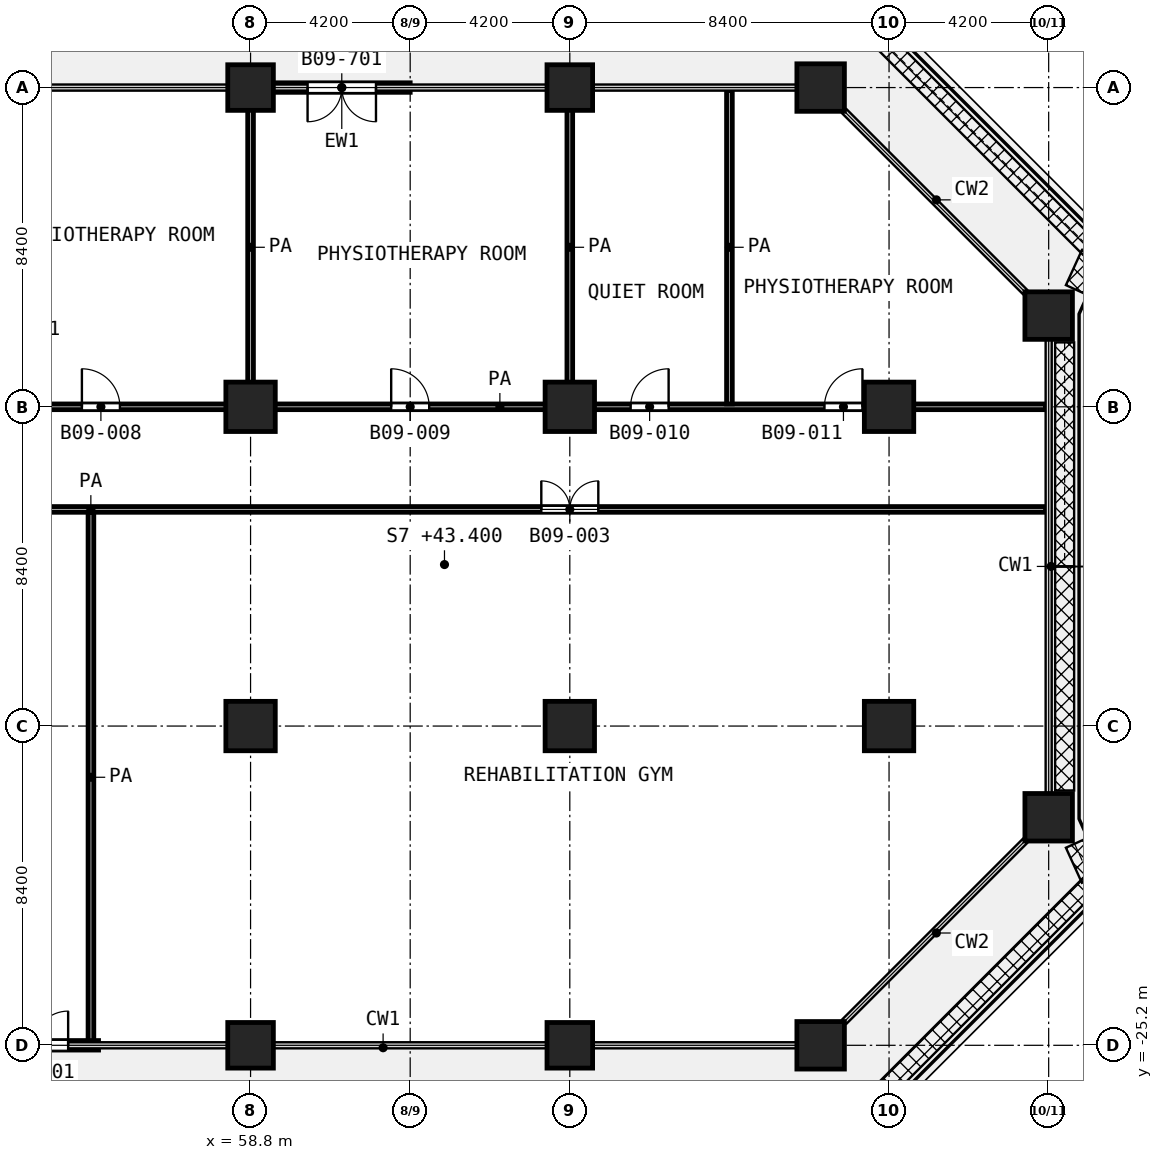
"""IFC4 building model, lengths in metres.
Left out: names, types, materials, properties, quantities, classifications, styles, units other than length and angle.
Written with IfcOpenShell. Run it as: python <this file> out.ifc"""

import sys

from ifc_helpers import new_model, si_unit, direction, frame, frame_2d, origin, origin_2d, place, context, subcontext, project, spatial, rectangle, extrude, element, fill, save


model = new_model("IFC4")
c1 = context("Model", 3, precision=1e-05, world=origin(), true_north=direction((0.0, 1.0)))
c2 = subcontext(c1, "Body", "Model", "MODEL_VIEW")
j1 = project(units=[si_unit("LENGTHUNIT", "METRE"), si_unit("PLANEANGLEUNIT", "RADIAN")], contexts=[c1])
p1 = place(None, origin())
s1 = spatial("IfcSite", under=j1, at=p1, CompositionType="ELEMENT")
p2 = place(p1, origin())
s2 = spatial("IfcBuilding", under=s1, at=p2, CompositionType="ELEMENT")
p3 = place(p2, frame((0.0, 0.0, 43.4)))
s3 = spatial("IfcBuildingStorey", under=s2, at=p3, CompositionType="ELEMENT", Elevation=43.4)
for number, where, z_axis, x_axis in (
    (1, (58.8, 0.0, 0.0), (0.0, 0.0, 1.0), (1.0, 0.0, 0.0)),
    (2, (67.2, 0.0, 0.0), (0.0, 0.0, 1.0), (1.0, 0.0, 0.0)),
):
    element("IfcColumn", number, at=place(p3, frame(where, z_axis=z_axis, x_axis=x_axis)), inside=s3, PredefinedType="COLUMN", context=c2, shape_type="SweptSolid", body=[
        extrude(rectangle(XDim=1.2, YDim=1.2, at=origin_2d()), origin(), (0.0, 0.0, 1.0), 4.2),
    ])
for number, where, z_axis, x_axis in (
    (3, (73.8, 0.0, 0.0), (0.0, 0.0, 1.0), (1.0, 0.0, 0.0)),
    (4, (79.8, -6.0, 0.0), (0.0, 0.0, 1.0), (1.0, 0.0, 0.0)),
):
    element("IfcColumn", number, at=place(p3, frame(where, z_axis=z_axis, x_axis=x_axis)), inside=s3, PredefinedType="COLUMN", context=c2, shape_type="SweptSolid", body=[
        extrude(rectangle(XDim=1.25, YDim=1.25, at=origin_2d()), origin(), (0.0, 0.0, 1.0), 4.2),
    ])
for number, where, z_axis, x_axis in (
    (5, (58.8, -8.4, 0.0), (0.0, 0.0, 1.0), (1.0, 0.0, 0.0)),
    (6, (67.2, -8.4, 0.0), (0.0, 0.0, 1.0), (1.0, 0.0, 0.0)),
    (7, (75.6, -8.4, 0.0), (0.0, 0.0, 1.0), (1.0, 0.0, 0.0)),
    (8, (58.8, -16.8, 0.0), (0.0, 0.0, 1.0), (1.0, 0.0, 0.0)),
    (9, (67.2, -16.8, 0.0), (0.0, 0.0, 1.0), (1.0, 0.0, 0.0)),
    (10, (75.6, -16.8, 0.0), (0.0, 0.0, 1.0), (1.0, 0.0, 0.0)),
):
    element("IfcColumn", number, at=place(p3, frame(where, z_axis=z_axis, x_axis=x_axis)), inside=s3, PredefinedType="COLUMN", context=c2, shape_type="SweptSolid", body=[
        extrude(rectangle(XDim=1.3, YDim=1.3, at=origin_2d()), origin(), (0.0, 0.0, 1.0), 4.2),
    ])
p4 = place(p3, frame((79.8, -19.2, 0.0), z_axis=(0.0, 0.0, 1.0), x_axis=(1.0, 0.0, 0.0)))
e11 = element("IfcColumn", 11, at=p4, inside=s3, PredefinedType="COLUMN", context=c2, shape_type="SweptSolid", body=[
    extrude(rectangle(XDim=1.25, YDim=1.25, at=origin_2d()), origin(), (0.0, 0.0, 1.0), 4.2),
])
for number, where, z_axis, x_axis in (
    (12, (58.8, -25.2, 0.0), (0.0, 0.0, 1.0), (1.0, 0.0, 0.0)),
    (13, (67.2, -25.2, 0.0), (0.0, 0.0, 1.0), (1.0, 0.0, 0.0)),
):
    element("IfcColumn", number, at=place(p3, frame(where, z_axis=z_axis, x_axis=x_axis)), inside=s3, PredefinedType="COLUMN", context=c2, shape_type="SweptSolid", body=[
        extrude(rectangle(XDim=1.2, YDim=1.2, at=origin_2d()), origin(), (0.0, 0.0, 1.0), 4.2),
    ])
p5 = place(p3, frame((73.8, -25.2, 0.0), z_axis=(0.0, 0.0, 1.0), x_axis=(1.0, 0.0, 0.0)))
e14 = element("IfcColumn", 14, at=p5, inside=s3, PredefinedType="COLUMN", context=c2, shape_type="SweptSolid", body=[
    extrude(rectangle(XDim=1.25, YDim=1.25, at=origin_2d()), origin(), (0.0, 0.0, 1.0), 4.2),
])
p6 = place(p3, frame((51.4, -25.2, 0.0), z_axis=(0.0, 0.0, 1.0), x_axis=(1.0, 0.0, 0.0)))
e15 = element("IfcWall", 15, at=p6, inside=s3, PredefinedType="SOLIDWALL", context=c2, shape_type="SweptSolid", body=[
    extrude(rectangle(XDim=3.4, YDim=0.25, at=frame_2d((1.7, 0.0))), origin(), (0.0, 0.0, 1.0), 3.78),
])
p7 = place(p6, frame((0.8, 0.0, 0.0)))
e16 = element("IfcOpeningElement", 16, at=p7, cuts=e15, PredefinedType="OPENING", context=c2, shape_type="SweptSolid", body=[
    extrude(rectangle(XDim=1.8, YDim=2.1, at=frame_2d((0.9, 1.05))), frame((0.0, 0.135, 0.0), z_axis=(0.0, -1.0, 0.0), x_axis=(1.0, 0.0, 0.0)), (0.0, 0.0, 1.0), 0.27),
])
p8 = place(p3, frame((63.0, 0.0, 0.0), z_axis=(0.0, 0.0, 1.0), x_axis=(-1.0, 0.0, 0.0)))
e17 = element("IfcWall", 17, at=p8, inside=s3, PredefinedType="SOLIDWALL", context=c2, shape_type="SweptSolid", body=[
    extrude(rectangle(XDim=3.6, YDim=0.25, at=frame_2d((1.8, 0.0))), origin(), (0.0, 0.0, 1.0), 3.78),
])
p9 = place(p8, frame((0.9, 0.0, 0.0)))
e18 = element("IfcOpeningElement", 18, at=p9, cuts=e17, PredefinedType="OPENING", context=c2, shape_type="SweptSolid", body=[
    extrude(rectangle(XDim=1.8, YDim=2.1, at=frame_2d((0.9, 1.05))), frame((0.0, 0.135, 0.0), z_axis=(0.0, -1.0, 0.0), x_axis=(1.0, 0.0, 0.0)), (0.0, 0.0, 1.0), 0.27),
])
p10 = place(p3, frame((29.475, -11.1, 0.0), z_axis=(0.0, 0.0, 1.0), x_axis=(1.0, 0.0, 0.0)))
e19 = element("IfcWall", 19, at=p10, inside=s3, PredefinedType="PARTITIONING", context=c2, shape_type="SweptSolid", body=[
    extrude(rectangle(XDim=50.245, YDim=0.15, at=frame_2d((25.123, 0.0))), origin(), (0.0, 0.0, 1.0), 3.9),
])
p11 = place(p10, frame((11.775, 0.0, 0.0)))
e20 = element("IfcOpeningElement", 20, at=p11, cuts=e19, PredefinedType="OPENING", context=c2, shape_type="SweptSolid", body=[
    extrude(rectangle(XDim=1.5, YDim=2.1, at=frame_2d((0.75, 1.05))), frame((0.0, 0.085, 0.0), z_axis=(0.0, -1.0, 0.0), x_axis=(1.0, 0.0, 0.0)), (0.0, 0.0, 1.0), 0.17),
])
p12 = place(p10, frame((36.975, 0.0, 0.0)))
e21 = element("IfcOpeningElement", 21, at=p12, cuts=e19, PredefinedType="OPENING", context=c2, shape_type="SweptSolid", body=[
    extrude(rectangle(XDim=1.5, YDim=2.1, at=frame_2d((0.75, 1.05))), frame((0.0, 0.085, 0.0), z_axis=(0.0, -1.0, 0.0), x_axis=(1.0, 0.0, 0.0)), (0.0, 0.0, 1.0), 0.17),
])
p13 = place(p3, frame((51.0, -8.4, 0.0), z_axis=(0.0, 0.0, 1.0), x_axis=(1.0, 0.0, 0.0)))
e22 = element("IfcWall", 22, at=p13, inside=s3, PredefinedType="PARTITIONING", context=c2, shape_type="SweptSolid", body=[
    extrude(rectangle(XDim=28.72, YDim=0.15, at=frame_2d((14.36, 0.0))), origin(), (0.0, 0.0, 1.0), 3.9),
])
p14 = place(p13, frame((3.362, 0.0, 0.0)))
e23 = element("IfcOpeningElement", 23, at=p14, cuts=e22, PredefinedType="OPENING", context=c2, shape_type="SweptSolid", body=[
    extrude(rectangle(XDim=1.0, YDim=2.1, at=frame_2d((0.5, 1.05))), frame((0.0, 0.085, 0.0), z_axis=(0.0, -1.0, 0.0), x_axis=(1.0, 0.0, 0.0)), (0.0, 0.0, 1.0), 0.17),
])
p15 = place(p13, frame((11.5, 0.0, 0.0)))
e24 = element("IfcOpeningElement", 24, at=p15, cuts=e22, PredefinedType="OPENING", context=c2, shape_type="SweptSolid", body=[
    extrude(rectangle(XDim=1.0, YDim=2.1, at=frame_2d((0.5, 1.05))), frame((0.0, 0.085, 0.0), z_axis=(0.0, -1.0, 0.0), x_axis=(1.0, 0.0, 0.0)), (0.0, 0.0, 1.0), 0.17),
])
p16 = place(p13, frame((17.8, 0.0, 0.0)))
e25 = element("IfcOpeningElement", 25, at=p16, cuts=e22, PredefinedType="OPENING", context=c2, shape_type="SweptSolid", body=[
    extrude(rectangle(XDim=1.0, YDim=2.1, at=frame_2d((0.5, 1.05))), frame((0.0, 0.085, 0.0), z_axis=(0.0, -1.0, 0.0), x_axis=(1.0, 0.0, 0.0)), (0.0, 0.0, 1.0), 0.17),
])
p17 = place(p13, frame((22.9, 0.0, 0.0)))
e26 = element("IfcOpeningElement", 26, at=p17, cuts=e22, PredefinedType="OPENING", context=c2, shape_type="SweptSolid", body=[
    extrude(rectangle(XDim=1.0, YDim=2.1, at=frame_2d((0.5, 1.05))), frame((0.0, 0.085, 0.0), z_axis=(0.0, -1.0, 0.0), x_axis=(1.0, 0.0, 0.0)), (0.0, 0.0, 1.0), 0.17),
])
p18 = place(p3, frame((54.6, -25.12, 0.0), z_axis=(0.0, 0.0, 1.0), x_axis=(0.0, 1.0, 0.0)))
e27 = element("IfcWall", 27, at=p18, inside=s3, PredefinedType="PARTITIONING", context=c2, shape_type="SweptSolid", body=[
    extrude(rectangle(XDim=13.945, YDim=0.15, at=frame_2d((6.973, 0.0))), origin(), (0.0, 0.0, 1.0), 3.9),
])
for number, where, z_axis, x_axis in (
    (28, (58.8, -8.325, 0.0), (0.0, 0.0, 1.0), (0.0, 1.0, 0.0)),
    (29, (67.2, -8.325, 0.0), (0.0, 0.0, 1.0), (0.0, 1.0, 0.0)),
    (30, (71.4, -8.325, 0.0), (0.0, 0.0, 1.0), (0.0, 1.0, 0.0)),
):
    element("IfcWall", number, at=place(p3, frame(where, z_axis=z_axis, x_axis=x_axis)), inside=s3, PredefinedType="PARTITIONING", context=c2, shape_type="SweptSolid", body=[
        extrude(rectangle(XDim=8.245, YDim=0.15, at=frame_2d((4.123, 0.0))), origin(), (0.0, 0.0, 1.0), 3.9),
    ])
p19 = place(p7, origin())
e31 = element("IfcDoor", 31, at=p19, inside=s3, OperationType="DOUBLE_DOOR_SINGLE_SWING", PredefinedType="DOOR", context=c2, shape_type="SweptSolid", body=[
    extrude(rectangle(XDim=1.8, YDim=2.1, at=frame_2d((0.9, 1.05))), frame((0.0, 0.025, 0.0), z_axis=(0.0, -1.0, 0.0), x_axis=(1.0, 0.0, 0.0)), (0.0, 0.0, 1.0), 0.05),
])
fill(e16, e31)
p20 = place(p9, origin())
e32 = element("IfcDoor", 32, at=p20, inside=s3, OperationType="DOUBLE_DOOR_SINGLE_SWING", PredefinedType="DOOR", context=c2, shape_type="SweptSolid", body=[
    extrude(rectangle(XDim=1.8, YDim=2.1, at=frame_2d((0.9, 1.05))), frame((0.0, 0.025, 0.0), z_axis=(0.0, -1.0, 0.0), x_axis=(1.0, 0.0, 0.0)), (0.0, 0.0, 1.0), 0.05),
])
fill(e18, e32)
p21 = place(p14, origin())
e33 = element("IfcDoor", 33, at=p21, inside=s3, OperationType="SINGLE_SWING_LEFT", PredefinedType="DOOR", context=c2, shape_type="SweptSolid", body=[
    extrude(rectangle(XDim=1.0, YDim=2.1, at=frame_2d((0.5, 1.05))), frame((0.0, 0.025, 0.0), z_axis=(0.0, -1.0, 0.0), x_axis=(1.0, 0.0, 0.0)), (0.0, 0.0, 1.0), 0.05),
])
fill(e23, e33)
p22 = place(p15, origin())
e34 = element("IfcDoor", 34, at=p22, inside=s3, OperationType="SINGLE_SWING_LEFT", PredefinedType="DOOR", context=c2, shape_type="SweptSolid", body=[
    extrude(rectangle(XDim=1.0, YDim=2.1, at=frame_2d((0.5, 1.05))), frame((0.0, 0.025, 0.0), z_axis=(0.0, -1.0, 0.0), x_axis=(1.0, 0.0, 0.0)), (0.0, 0.0, 1.0), 0.05),
])
fill(e24, e34)
p23 = place(p16, origin())
e35 = element("IfcDoor", 35, at=p23, inside=s3, OperationType="SINGLE_SWING_RIGHT", PredefinedType="DOOR", context=c2, shape_type="SweptSolid", body=[
    extrude(rectangle(XDim=1.0, YDim=2.1, at=frame_2d((0.5, 1.05))), frame((0.0, 0.025, 0.0), z_axis=(0.0, -1.0, 0.0), x_axis=(1.0, 0.0, 0.0)), (0.0, 0.0, 1.0), 0.05),
])
fill(e25, e35)
p24 = place(p17, origin())
e36 = element("IfcDoor", 36, at=p24, inside=s3, OperationType="SINGLE_SWING_RIGHT", PredefinedType="DOOR", context=c2, shape_type="SweptSolid", body=[
    extrude(rectangle(XDim=1.0, YDim=2.1, at=frame_2d((0.5, 1.05))), frame((0.0, 0.025, 0.0), z_axis=(0.0, -1.0, 0.0), x_axis=(1.0, 0.0, 0.0)), (0.0, 0.0, 1.0), 0.05),
])
fill(e26, e36)
p25 = place(p12, origin())
e37 = element("IfcDoor", 37, at=p25, inside=s3, OperationType="DOUBLE_DOOR_SINGLE_SWING", PredefinedType="DOOR", context=c2, shape_type="SweptSolid", body=[
    extrude(rectangle(XDim=1.5, YDim=2.1, at=frame_2d((0.75, 1.05))), frame((0.0, 0.025, 0.0), z_axis=(0.0, -1.0, 0.0), x_axis=(1.0, 0.0, 0.0)), (0.0, 0.0, 1.0), 0.05),
])
fill(e21, e37)
save(model, sys.argv[1])
